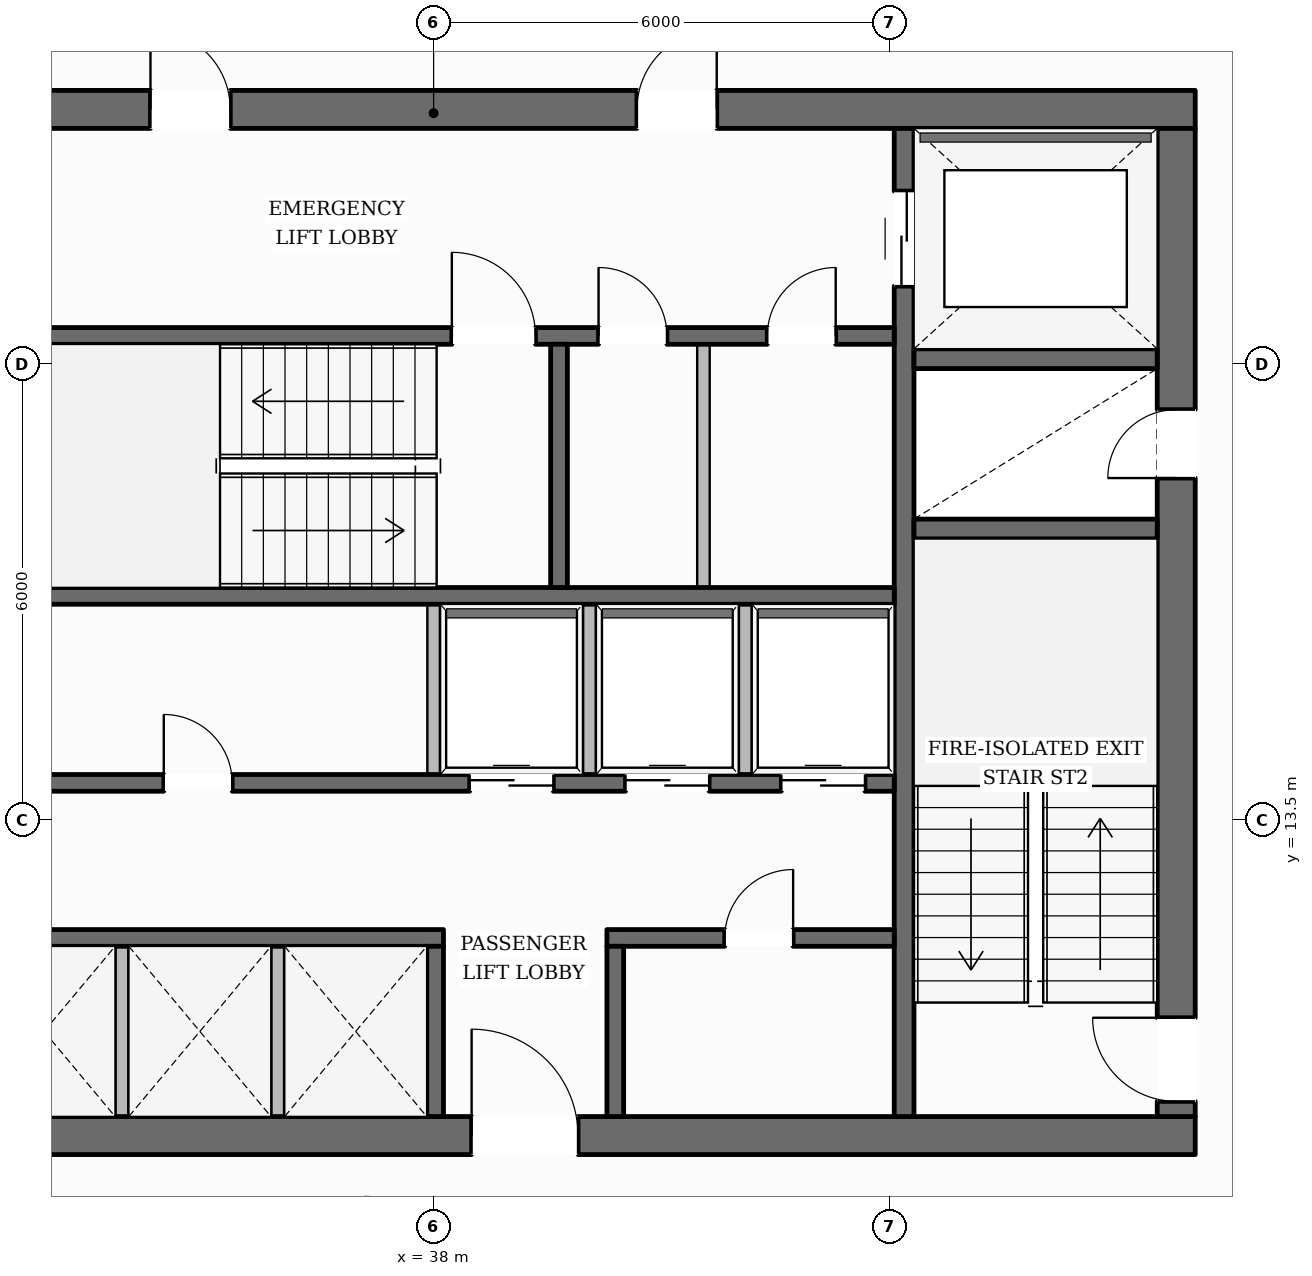
"""IFC4 building model, lengths in metres.
Left out: names, types, materials, properties, quantities, classifications, styles, units other than length and angle.
Written with IfcOpenShell. Run it as: python <this file> out.ifc"""

import sys

from ifc_helpers import new_model, si_unit, direction, frame, frame_2d, origin, place, context, subcontext, project, spatial, rectangle, extrude, element, fill, save


model = new_model("IFC4")
c1 = context("Model", 3, precision=1e-05, world=origin(), true_north=direction((0.0, 1.0)))
c2 = subcontext(c1, "Body", "Model", "MODEL_VIEW")
j1 = project(units=[si_unit("LENGTHUNIT", "METRE"), si_unit("PLANEANGLEUNIT", "RADIAN")], contexts=[c1])
p1 = place(None, origin())
s1 = spatial("IfcSite", under=j1, at=p1, CompositionType="ELEMENT")
p2 = place(p1, origin())
s2 = spatial("IfcBuilding", under=s1, at=p2, CompositionType="ELEMENT")
p3 = place(p2, frame((0.0, 0.0, 143.25)))
s3 = spatial("IfcBuildingStorey", under=s2, at=p3, CompositionType="ELEMENT", Elevation=143.25)
p4 = place(p3, frame((27.98, 9.35, 0.0), z_axis=(0.0, 0.0, 1.0), x_axis=(1.0, 0.0, 0.0)))
e1 = element("IfcWall", 1, at=p4, inside=s3, PredefinedType="SOLIDWALL", context=c2, shape_type="SweptSolid", body=[
    extrude(rectangle(XDim=20.04, YDim=0.5, at=frame_2d((10.02, 0.0))), origin(), (0.0, 0.0, 1.0), 3.6),
])
p5 = place(p4, frame((10.52, 0.0, 0.0)))
e2 = element("IfcOpeningElement", 2, at=p5, cuts=e1, PredefinedType="OPENING", context=c2, shape_type="SweptSolid", body=[
    extrude(rectangle(XDim=1.4, YDim=2.2, at=frame_2d((0.7, 1.1))), frame((0.0, 0.26, 0.0), z_axis=(0.0, -1.0, 0.0), x_axis=(1.0, 0.0, 0.0)), (0.0, 0.0, 1.0), 0.52),
])
p6 = place(p3, frame((27.98, 22.85, 0.0), z_axis=(0.0, 0.0, 1.0), x_axis=(1.0, 0.0, 0.0)))
e3 = element("IfcWall", 3, at=p6, inside=s3, PredefinedType="SOLIDWALL", context=c2, shape_type="SweptSolid", body=[
    extrude(rectangle(XDim=20.04, YDim=0.5, at=frame_2d((10.02, 0.0))), origin(), (0.0, 0.0, 1.0), 3.6),
])
p7 = place(p6, frame((6.295, 0.0, 0.0)))
e4 = element("IfcOpeningElement", 4, at=p7, cuts=e3, PredefinedType="OPENING", context=c2, shape_type="SweptSolid", body=[
    extrude(rectangle(XDim=1.05, YDim=2.15, at=frame_2d((0.525, 1.075))), frame((0.0, 0.26, 0.0), z_axis=(0.0, -1.0, 0.0), x_axis=(1.0, 0.0, 0.0)), (0.0, 0.0, 1.0), 0.52),
])
p8 = place(p6, frame((12.695, 0.0, 0.0)))
e5 = element("IfcOpeningElement", 5, at=p8, cuts=e3, PredefinedType="OPENING", context=c2, shape_type="SweptSolid", body=[
    extrude(rectangle(XDim=1.05, YDim=2.15, at=frame_2d((0.525, 1.075))), frame((0.0, 0.26, 0.0), z_axis=(0.0, -1.0, 0.0), x_axis=(1.0, 0.0, 0.0)), (0.0, 0.0, 1.0), 0.52),
])
p9 = place(p3, frame((47.77, 9.6, 0.0), z_axis=(0.0, 0.0, 1.0), x_axis=(0.0, 1.0, 0.0)))
e6 = element("IfcWall", 6, at=p9, inside=s3, PredefinedType="SOLIDWALL", context=c2, shape_type="SweptSolid", body=[
    extrude(rectangle(XDim=13.0, YDim=0.5, at=frame_2d((6.5, 0.0))), origin(), (0.0, 0.0, 1.0), 3.6),
])
p10 = place(p9, frame((0.2, 0.0, 0.0)))
e7 = element("IfcOpeningElement", 7, at=p10, cuts=e6, PredefinedType="OPENING", context=c2, shape_type="SweptSolid", body=[
    extrude(rectangle(XDim=1.1, YDim=2.15, at=frame_2d((0.55, 1.075))), frame((0.0, 0.26, 0.0), z_axis=(0.0, -1.0, 0.0), x_axis=(1.0, 0.0, 0.0)), (0.0, 0.0, 1.0), 0.52),
])
p11 = place(p9, frame((8.4, 0.0, 0.0)))
e8 = element("IfcOpeningElement", 8, at=p11, cuts=e6, PredefinedType="OPENING", context=c2, shape_type="SweptSolid", body=[
    extrude(rectangle(XDim=0.9, YDim=2.1, at=frame_2d((0.45, 1.05))), frame((0.0, 0.26, 0.0), z_axis=(0.0, -1.0, 0.0), x_axis=(1.0, 0.0, 0.0)), (0.0, 0.0, 1.0), 0.52),
])
p12 = place(p3, frame((44.19, 9.6, 0.0), z_axis=(0.0, 0.0, 1.0), x_axis=(0.0, 1.0, 0.0)))
e9 = element("IfcWall", 9, at=p12, inside=s3, PredefinedType="SHEAR", context=c2, shape_type="SweptSolid", body=[
    extrude(rectangle(XDim=13.0, YDim=0.26, at=frame_2d((6.5, 0.0))), origin(), (0.0, 0.0, 1.0), 3.6),
])
p13 = place(p12, frame((10.925, 0.0, 0.0)))
e10 = element("IfcOpeningElement", 10, at=p13, cuts=e9, PredefinedType="OPENING", context=c2, shape_type="SweptSolid", body=[
    extrude(rectangle(XDim=1.25, YDim=2.25, at=frame_2d((0.625, 1.125))), frame((0.0, 0.14, 0.0), z_axis=(0.0, -1.0, 0.0), x_axis=(1.0, 0.0, 0.0)), (0.0, 0.0, 1.0), 0.28),
])
for number, where, z_axis, x_axis in (
    (11, (44.32, 17.33, 0.0), (0.0, 0.0, 1.0), (1.0, 0.0, 0.0)),
    (12, (44.32, 19.57, 0.0), (0.0, 0.0, 1.0), (1.0, 0.0, 0.0)),
):
    element("IfcWall", number, at=place(p3, frame(where, z_axis=z_axis, x_axis=x_axis)), inside=s3, PredefinedType="SHEAR", context=c2, shape_type="SweptSolid", body=[
        extrude(rectangle(XDim=3.2, YDim=0.26, at=frame_2d((1.6, 0.0))), origin(), (0.0, 0.0, 1.0), 3.6),
    ])
p14 = place(p3, frame((31.94, 19.87, 0.0), z_axis=(0.0, 0.0, 1.0), x_axis=(1.0, 0.0, 0.0)))
e13 = element("IfcWall", 13, at=p14, inside=s3, PredefinedType="SOLIDWALL", context=c2, shape_type="SweptSolid", body=[
    extrude(rectangle(XDim=12.12, YDim=0.22, at=frame_2d((6.06, 0.0))), origin(), (0.0, 0.0, 1.0), 3.6),
])
p15 = place(p14, frame((6.3, 0.0, 0.0)))
e14 = element("IfcOpeningElement", 14, at=p15, cuts=e13, PredefinedType="OPENING", context=c2, shape_type="SweptSolid", body=[
    extrude(rectangle(XDim=1.1, YDim=2.15, at=frame_2d((0.55, 1.075))), frame((0.0, 0.12, 0.0), z_axis=(0.0, -1.0, 0.0), x_axis=(1.0, 0.0, 0.0)), (0.0, 0.0, 1.0), 0.24),
])
p16 = place(p14, frame((8.23, 0.0, 0.0)))
e15 = element("IfcOpeningElement", 15, at=p16, cuts=e13, PredefinedType="OPENING", context=c2, shape_type="SweptSolid", body=[
    extrude(rectangle(XDim=0.9, YDim=2.1, at=frame_2d((0.45, 1.05))), frame((0.0, 0.12, 0.0), z_axis=(0.0, -1.0, 0.0), x_axis=(1.0, 0.0, 0.0)), (0.0, 0.0, 1.0), 0.24),
])
p17 = place(p14, frame((10.45, 0.0, 0.0)))
e16 = element("IfcOpeningElement", 16, at=p17, cuts=e13, PredefinedType="OPENING", context=c2, shape_type="SweptSolid", body=[
    extrude(rectangle(XDim=0.9, YDim=2.1, at=frame_2d((0.45, 1.05))), frame((0.0, 0.12, 0.0), z_axis=(0.0, -1.0, 0.0), x_axis=(1.0, 0.0, 0.0)), (0.0, 0.0, 1.0), 0.24),
])
p18 = place(p3, frame((31.94, 16.45, 0.0), z_axis=(0.0, 0.0, 1.0), x_axis=(1.0, 0.0, 0.0)))
e17 = element("IfcWall", 17, at=p18, inside=s3, PredefinedType="SOLIDWALL", context=c2, shape_type="SweptSolid", body=[
    extrude(rectangle(XDim=12.12, YDim=0.22, at=frame_2d((6.06, 0.0))), origin(), (0.0, 0.0, 1.0), 3.6),
])
p19 = place(p3, frame((39.65, 16.56, 0.0), z_axis=(0.0, 0.0, 1.0), x_axis=(0.0, 1.0, 0.0)))
e18 = element("IfcWall", 18, at=p19, inside=s3, PredefinedType="SOLIDWALL", context=c2, shape_type="SweptSolid", body=[
    extrude(rectangle(XDim=3.2, YDim=0.22, at=frame_2d((1.6, 0.0))), origin(), (0.0, 0.0, 1.0), 3.6),
])
p20 = place(p3, frame((31.94, 13.99, 0.0), z_axis=(0.0, 0.0, 1.0), x_axis=(1.0, 0.0, 0.0)))
e19 = element("IfcWall", 19, at=p20, inside=s3, PredefinedType="SOLIDWALL", context=c2, shape_type="SweptSolid", body=[
    extrude(rectangle(XDim=12.12, YDim=0.22, at=frame_2d((6.06, 0.0))), origin(), (0.0, 0.0, 1.0), 3.6),
])
p21 = place(p20, frame((2.51, 0.0, 0.0)))
e20 = element("IfcOpeningElement", 20, at=p21, cuts=e19, PredefinedType="OPENING", context=c2, shape_type="SweptSolid", body=[
    extrude(rectangle(XDim=0.9, YDim=2.1, at=frame_2d((0.45, 1.05))), frame((0.0, 0.12, 0.0), z_axis=(0.0, -1.0, 0.0), x_axis=(1.0, 0.0, 0.0)), (0.0, 0.0, 1.0), 0.24),
])
p22 = place(p20, frame((6.535, 0.0, 0.0)))
e21 = element("IfcOpeningElement", 21, at=p22, cuts=e19, PredefinedType="OPENING", context=c2, shape_type="SweptSolid", body=[
    extrude(rectangle(XDim=1.1, YDim=2.2, at=frame_2d((0.55, 1.1))), frame((0.0, 0.12, 0.0), z_axis=(0.0, -1.0, 0.0), x_axis=(1.0, 0.0, 0.0)), (0.0, 0.0, 1.0), 0.24),
])
p23 = place(p20, frame((8.585, 0.0, 0.0)))
e22 = element("IfcOpeningElement", 22, at=p23, cuts=e19, PredefinedType="OPENING", context=c2, shape_type="SweptSolid", body=[
    extrude(rectangle(XDim=1.1, YDim=2.2, at=frame_2d((0.55, 1.1))), frame((0.0, 0.12, 0.0), z_axis=(0.0, -1.0, 0.0), x_axis=(1.0, 0.0, 0.0)), (0.0, 0.0, 1.0), 0.24),
])
p24 = place(p20, frame((10.635, 0.0, 0.0)))
e23 = element("IfcOpeningElement", 23, at=p24, cuts=e19, PredefinedType="OPENING", context=c2, shape_type="SweptSolid", body=[
    extrude(rectangle(XDim=1.1, YDim=2.2, at=frame_2d((0.55, 1.1))), frame((0.0, 0.12, 0.0), z_axis=(0.0, -1.0, 0.0), x_axis=(1.0, 0.0, 0.0)), (0.0, 0.0, 1.0), 0.24),
])
p25 = place(p3, frame((31.94, 11.95, 0.0), z_axis=(0.0, 0.0, 1.0), x_axis=(1.0, 0.0, 0.0)))
e24 = element("IfcWall", 24, at=p25, inside=s3, PredefinedType="SOLIDWALL", context=c2, shape_type="SweptSolid", body=[
    extrude(rectangle(XDim=6.19, YDim=0.22, at=frame_2d((3.095, 0.0))), origin(), (0.0, 0.0, 1.0), 3.6),
])
p26 = place(p3, frame((40.28, 11.95, 0.0), z_axis=(0.0, 0.0, 1.0), x_axis=(1.0, 0.0, 0.0)))
e25 = element("IfcWall", 25, at=p26, inside=s3, PredefinedType="SOLIDWALL", context=c2, shape_type="SweptSolid", body=[
    extrude(rectangle(XDim=3.78, YDim=0.22, at=frame_2d((1.89, 0.0))), origin(), (0.0, 0.0, 1.0), 3.6),
])
p27 = place(p26, frame((1.55, 0.0, 0.0)))
e26 = element("IfcOpeningElement", 26, at=p27, cuts=e25, PredefinedType="OPENING", context=c2, shape_type="SweptSolid", body=[
    extrude(rectangle(XDim=0.9, YDim=2.1, at=frame_2d((0.45, 1.05))), frame((0.0, 0.12, 0.0), z_axis=(0.0, -1.0, 0.0), x_axis=(1.0, 0.0, 0.0)), (0.0, 0.0, 1.0), 0.24),
])
for number, where, z_axis, x_axis in (
    (27, (38.02, 9.6, 0.0), (0.0, 0.0, 1.0), (0.0, 1.0, 0.0)),
    (28, (40.39, 9.6, 0.0), (0.0, 0.0, 1.0), (0.0, 1.0, 0.0)),
):
    element("IfcWall", number, at=place(p3, frame(where, z_axis=z_axis, x_axis=x_axis)), inside=s3, PredefinedType="SOLIDWALL", context=c2, shape_type="SweptSolid", body=[
        extrude(rectangle(XDim=2.24, YDim=0.22, at=frame_2d((1.12, 0.0))), origin(), (0.0, 0.0, 1.0), 3.6),
    ])
p28 = place(p3, frame((43.361, 44.893, 0.0), z_axis=(0.0, 0.0, 1.0), x_axis=(0.499094622433, -0.866547493135, 0.0)))
e29 = element("IfcWall", 29, at=p28, inside=s3, PredefinedType="STANDARD", context=c2, shape_type="SweptSolid", body=[
    extrude(rectangle(XDim=37.644, YDim=0.38, at=frame_2d((18.822, 0.0))), origin(), (0.0, 0.0, 1.0), 3.059),
])
p29 = place(p28, frame((33.333, 0.0, 0.65)))
e30 = element("IfcOpeningElement", 30, at=p29, cuts=e29, PredefinedType="OPENING", context=c2, shape_type="SweptSolid", body=[
    extrude(rectangle(XDim=1.55, YDim=1.75, at=frame_2d((0.775, 0.875))), frame((0.0, 0.2, 0.0), z_axis=(0.0, -1.0, 0.0), x_axis=(1.0, 0.0, 0.0)), (0.0, 0.0, 1.0), 0.4),
])
p30 = place(p28, frame((27.219, 0.0, 0.65)))
e31 = element("IfcOpeningElement", 31, at=p30, cuts=e29, PredefinedType="OPENING", context=c2, shape_type="SweptSolid", body=[
    extrude(rectangle(XDim=1.55, YDim=1.75, at=frame_2d((0.775, 0.875))), frame((0.0, 0.2, 0.0), z_axis=(0.0, -1.0, 0.0), x_axis=(1.0, 0.0, 0.0)), (0.0, 0.0, 1.0), 0.4),
])
p31 = place(p28, frame((21.105, 0.0, 0.65)))
e32 = element("IfcOpeningElement", 32, at=p31, cuts=e29, PredefinedType="OPENING", context=c2, shape_type="SweptSolid", body=[
    extrude(rectangle(XDim=1.55, YDim=1.75, at=frame_2d((0.775, 0.875))), frame((0.0, 0.2, 0.0), z_axis=(0.0, -1.0, 0.0), x_axis=(1.0, 0.0, 0.0)), (0.0, 0.0, 1.0), 0.4),
])
p32 = place(p28, frame((8.876, 0.0, 0.65)))
e33 = element("IfcOpeningElement", 33, at=p32, cuts=e29, PredefinedType="OPENING", context=c2, shape_type="SweptSolid", body=[
    extrude(rectangle(XDim=1.55, YDim=1.75, at=frame_2d((0.775, 0.875))), frame((0.0, 0.2, 0.0), z_axis=(0.0, -1.0, 0.0), x_axis=(1.0, 0.0, 0.0)), (0.0, 0.0, 1.0), 0.4),
])
p33 = place(p28, frame((2.762, 0.0, 0.65)))
e34 = element("IfcOpeningElement", 34, at=p33, cuts=e29, PredefinedType="OPENING", context=c2, shape_type="SweptSolid", body=[
    extrude(rectangle(XDim=1.55, YDim=1.75, at=frame_2d((0.775, 0.875))), frame((0.0, 0.2, 0.0), z_axis=(0.0, -1.0, 0.0), x_axis=(1.0, 0.0, 0.0)), (0.0, 0.0, 1.0), 0.4),
])
for number, where, z_axis, x_axis in (
    (35, (33.9, 9.55, 0.0), (0.0, 0.0, 1.0), (0.0, 1.0, 0.0)),
    (36, (35.95, 9.55, 0.0), (0.0, 0.0, 1.0), (0.0, 1.0, 0.0)),
):
    element("IfcWall", number, at=place(p3, frame(where, z_axis=z_axis, x_axis=x_axis)), inside=s3, PredefinedType="PARTITIONING", context=c2, shape_type="SweptSolid", body=[
        extrude(rectangle(XDim=2.29, YDim=0.165, at=frame_2d((1.145, 0.0))), origin(), (0.0, 0.0, 1.0), 3.6),
    ])
for number, where, z_axis, x_axis in (
    (37, (38.0, 14.1, 0.0), (0.0, 0.0, 1.0), (0.0, 1.0, 0.0)),
    (38, (40.05, 14.1, 0.0), (0.0, 0.0, 1.0), (0.0, 1.0, 0.0)),
    (39, (42.1, 14.1, 0.0), (0.0, 0.0, 1.0), (0.0, 1.0, 0.0)),
):
    element("IfcWall", number, at=place(p3, frame(where, z_axis=z_axis, x_axis=x_axis)), inside=s3, PredefinedType="PARTITIONING", context=c2, shape_type="SweptSolid", body=[
        extrude(rectangle(XDim=2.24, YDim=0.165, at=frame_2d((1.12, 0.0))), origin(), (0.0, 0.0, 1.0), 3.6),
    ])
p34 = place(p3, frame((41.55, 16.56, 0.0), z_axis=(0.0, 0.0, 1.0), x_axis=(0.0, 1.0, 0.0)))
e40 = element("IfcWall", 40, at=p34, inside=s3, PredefinedType="PARTITIONING", context=c2, shape_type="SweptSolid", body=[
    extrude(rectangle(XDim=3.2, YDim=0.165, at=frame_2d((1.6, 0.0))), origin(), (0.0, 0.0, 1.0), 3.6),
])
p35 = place(p10, origin())
e41 = element("IfcDoor", 41, at=p35, inside=s3, OperationType="SINGLE_SWING_RIGHT", PredefinedType="DOOR", context=c2, shape_type="SweptSolid", body=[
    extrude(rectangle(XDim=1.1, YDim=2.15, at=frame_2d((0.55, 1.075))), frame((0.0, 0.025, 0.0), z_axis=(0.0, -1.0, 0.0), x_axis=(1.0, 0.0, 0.0)), (0.0, 0.0, 1.0), 0.05),
])
fill(e7, e41)
p36 = place(p15, origin())
e42 = element("IfcDoor", 42, at=p36, inside=s3, OperationType="SINGLE_SWING_LEFT", PredefinedType="DOOR", context=c2, shape_type="SweptSolid", body=[
    extrude(rectangle(XDim=1.1, YDim=2.15, at=frame_2d((0.55, 1.075))), frame((0.0, 0.025, 0.0), z_axis=(0.0, -1.0, 0.0), x_axis=(1.0, 0.0, 0.0)), (0.0, 0.0, 1.0), 0.05),
])
fill(e14, e42)
p37 = place(p11, origin())
e43 = element("IfcDoor", 43, at=p37, inside=s3, OperationType="SINGLE_SWING_LEFT", PredefinedType="DOOR", context=c2, shape_type="SweptSolid", body=[
    extrude(rectangle(XDim=0.9, YDim=2.1, at=frame_2d((0.45, 1.05))), frame((0.0, 0.025, 0.0), z_axis=(0.0, -1.0, 0.0), x_axis=(1.0, 0.0, 0.0)), (0.0, 0.0, 1.0), 0.05),
])
fill(e8, e43)
p38 = place(p7, origin())
e44 = element("IfcDoor", 44, at=p38, inside=s3, OperationType="SINGLE_SWING_LEFT", PredefinedType="DOOR", context=c2, shape_type="SweptSolid", body=[
    extrude(rectangle(XDim=1.05, YDim=2.15, at=frame_2d((0.525, 1.075))), frame((0.0, 0.025, 0.0), z_axis=(0.0, -1.0, 0.0), x_axis=(1.0, 0.0, 0.0)), (0.0, 0.0, 1.0), 0.05),
])
fill(e4, e44)
p39 = place(p8, origin())
e45 = element("IfcDoor", 45, at=p39, inside=s3, OperationType="SINGLE_SWING_RIGHT", PredefinedType="DOOR", context=c2, shape_type="SweptSolid", body=[
    extrude(rectangle(XDim=1.05, YDim=2.15, at=frame_2d((0.525, 1.075))), frame((0.0, 0.025, 0.0), z_axis=(0.0, -1.0, 0.0), x_axis=(1.0, 0.0, 0.0)), (0.0, 0.0, 1.0), 0.05),
])
fill(e5, e45)
p40 = place(p13, origin())
e46 = element("IfcDoor", 46, at=p40, inside=s3, OperationType="DOUBLE_DOOR_SLIDING", PredefinedType="DOOR", context=c2, shape_type="SweptSolid", body=[
    extrude(rectangle(XDim=1.25, YDim=2.25, at=frame_2d((0.625, 1.125))), frame((0.0, 0.025, 0.0), z_axis=(0.0, -1.0, 0.0), x_axis=(1.0, 0.0, 0.0)), (0.0, 0.0, 1.0), 0.05),
])
fill(e10, e46)
p41 = place(p5, origin())
e47 = element("IfcDoor", 47, at=p41, inside=s3, OperationType="SINGLE_SWING_LEFT", PredefinedType="DOOR", context=c2, shape_type="SweptSolid", body=[
    extrude(rectangle(XDim=1.4, YDim=2.2, at=frame_2d((0.7, 1.1))), frame((0.0, 0.025, 0.0), z_axis=(0.0, -1.0, 0.0), x_axis=(1.0, 0.0, 0.0)), (0.0, 0.0, 1.0), 0.05),
])
fill(e2, e47)
p42 = place(p21, origin())
e48 = element("IfcDoor", 48, at=p42, inside=s3, OperationType="SINGLE_SWING_LEFT", PredefinedType="DOOR", context=c2, shape_type="SweptSolid", body=[
    extrude(rectangle(XDim=0.9, YDim=2.1, at=frame_2d((0.45, 1.05))), frame((0.0, 0.025, 0.0), z_axis=(0.0, -1.0, 0.0), x_axis=(1.0, 0.0, 0.0)), (0.0, 0.0, 1.0), 0.05),
])
fill(e20, e48)
p43 = place(p22, origin())
e49 = element("IfcDoor", 49, at=p43, inside=s3, OperationType="DOUBLE_DOOR_SLIDING", PredefinedType="DOOR", context=c2, shape_type="SweptSolid", body=[
    extrude(rectangle(XDim=1.1, YDim=2.2, at=frame_2d((0.55, 1.1))), frame((0.0, 0.025, 0.0), z_axis=(0.0, -1.0, 0.0), x_axis=(1.0, 0.0, 0.0)), (0.0, 0.0, 1.0), 0.05),
])
fill(e21, e49)
p44 = place(p23, origin())
e50 = element("IfcDoor", 50, at=p44, inside=s3, OperationType="DOUBLE_DOOR_SLIDING", PredefinedType="DOOR", context=c2, shape_type="SweptSolid", body=[
    extrude(rectangle(XDim=1.1, YDim=2.2, at=frame_2d((0.55, 1.1))), frame((0.0, 0.025, 0.0), z_axis=(0.0, -1.0, 0.0), x_axis=(1.0, 0.0, 0.0)), (0.0, 0.0, 1.0), 0.05),
])
fill(e22, e50)
p45 = place(p24, origin())
e51 = element("IfcDoor", 51, at=p45, inside=s3, OperationType="DOUBLE_DOOR_SLIDING", PredefinedType="DOOR", context=c2, shape_type="SweptSolid", body=[
    extrude(rectangle(XDim=1.1, YDim=2.2, at=frame_2d((0.55, 1.1))), frame((0.0, 0.025, 0.0), z_axis=(0.0, -1.0, 0.0), x_axis=(1.0, 0.0, 0.0)), (0.0, 0.0, 1.0), 0.05),
])
fill(e23, e51)
p46 = place(p16, origin())
e52 = element("IfcDoor", 52, at=p46, inside=s3, OperationType="SINGLE_SWING_LEFT", PredefinedType="DOOR", context=c2, shape_type="SweptSolid", body=[
    extrude(rectangle(XDim=0.9, YDim=2.1, at=frame_2d((0.45, 1.05))), frame((0.0, 0.025, 0.0), z_axis=(0.0, -1.0, 0.0), x_axis=(1.0, 0.0, 0.0)), (0.0, 0.0, 1.0), 0.05),
])
fill(e15, e52)
p47 = place(p17, origin())
e53 = element("IfcDoor", 53, at=p47, inside=s3, OperationType="SINGLE_SWING_RIGHT", PredefinedType="DOOR", context=c2, shape_type="SweptSolid", body=[
    extrude(rectangle(XDim=0.9, YDim=2.1, at=frame_2d((0.45, 1.05))), frame((0.0, 0.025, 0.0), z_axis=(0.0, -1.0, 0.0), x_axis=(1.0, 0.0, 0.0)), (0.0, 0.0, 1.0), 0.05),
])
fill(e16, e53)
p48 = place(p27, origin())
e54 = element("IfcDoor", 54, at=p48, inside=s3, OperationType="SINGLE_SWING_RIGHT", PredefinedType="DOOR", context=c2, shape_type="SweptSolid", body=[
    extrude(rectangle(XDim=0.9, YDim=2.1, at=frame_2d((0.45, 1.05))), frame((0.0, 0.025, 0.0), z_axis=(0.0, -1.0, 0.0), x_axis=(1.0, 0.0, 0.0)), (0.0, 0.0, 1.0), 0.05),
])
fill(e26, e54)
save(model, sys.argv[1])
